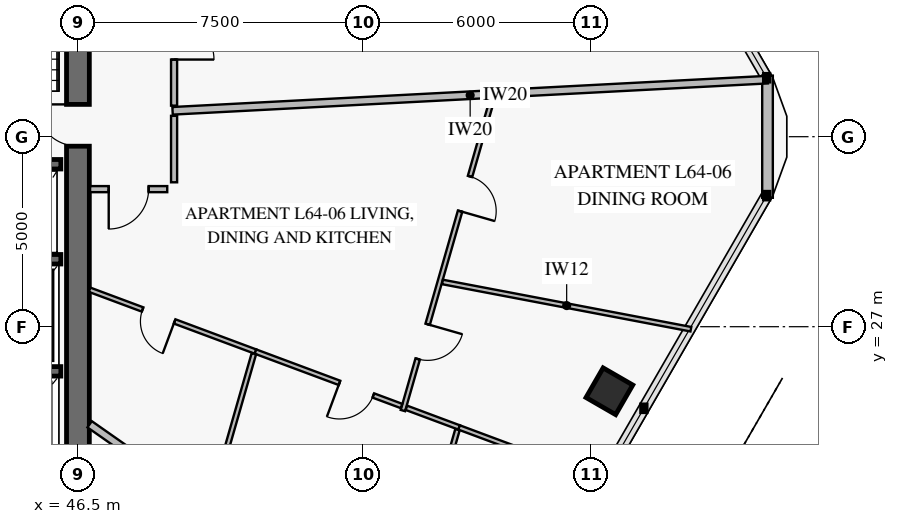
"""IFC4 building model, lengths in metres.
Left out: names, types, materials, properties, quantities, classifications, styles, units other than length and angle.
Written with IfcOpenShell. Run it as: python <this file> out.ifc"""

import sys

from ifc_helpers import new_model, si_unit, direction, frame, frame_2d, origin, origin_2d, place, context, subcontext, project, spatial, rectangle, extrude, element, fill, save


model = new_model("IFC4")
c1 = context("Model", 3, precision=1e-05, world=origin(), true_north=direction((0.0, 1.0)))
c2 = subcontext(c1, "Body", "Model", "MODEL_VIEW")
j1 = project(units=[si_unit("LENGTHUNIT", "METRE"), si_unit("PLANEANGLEUNIT", "RADIAN")], contexts=[c1])
p1 = place(None, origin())
s1 = spatial("IfcSite", under=j1, at=p1, CompositionType="ELEMENT")
p2 = place(p1, origin())
s2 = spatial("IfcBuilding", under=s1, at=p2, CompositionType="ELEMENT")
p3 = place(p2, frame((0.0, 0.0, 254.0)))
s3 = spatial("IfcBuildingStorey", under=s2, at=p3, CompositionType="ELEMENT", Elevation=254.0)
p4 = place(p3, frame((46.5, 22.8, 0.0), z_axis=(0.0, 0.0, 1.0), x_axis=(0.0, 1.0, 0.0)))
e1 = element("IfcWall", 1, at=p4, inside=s3, PredefinedType="SHEAR", context=c2, shape_type="SweptSolid", body=[
    extrude(rectangle(XDim=18.4, YDim=0.6, at=frame_2d((9.2, 0.0))), origin(), (0.0, 0.0, 1.0), 3.8),
])
p5 = place(p4, frame((8.95, 0.0, 0.0)))
e2 = element("IfcOpeningElement", 2, at=p5, cuts=e1, PredefinedType="OPENING", context=c2, shape_type="SweptSolid", body=[
    extrude(rectangle(XDim=1.1, YDim=2.15, at=frame_2d((0.55, 1.075))), frame((0.0, 0.312, 0.0), z_axis=(0.0, -1.0, 0.0), x_axis=(1.0, 0.0, 0.0)), (0.0, 0.0, 1.0), 0.624),
])
p6 = place(p3, frame((60.485, 25.301, 0.0), z_axis=(0.0, 0.0, 1.0), x_axis=(0.5, 0.866025403784, 0.0)))
e3 = element("IfcColumn", 3, at=p6, inside=s3, PredefinedType="COLUMN", context=c2, shape_type="SweptSolid", body=[
    extrude(rectangle(XDim=0.9, YDim=0.9, at=origin_2d()), origin(), (0.0, 0.0, 1.0), 3.55),
])
p7 = place(p3, frame((64.645, 33.607, 0.0), z_axis=(0.0, 0.0, 1.0), x_axis=(0.0, -1.0, 0.0)))
e4 = element("IfcWall", 4, at=p7, inside=s3, PredefinedType="SOLIDWALL", context=c2, shape_type="SweptSolid", body=[
    extrude(rectangle(XDim=3.215, YDim=0.28, at=frame_2d((1.607, 0.0))), origin(), (0.0, 0.0, 1.0), 3.55),
])
p8 = place(p3, frame((25.95, 31.275, 0.0), z_axis=(0.0, 0.0, 1.0), x_axis=(1.0, 0.0, 0.0)))
e5 = element("IfcWall", 5, at=p8, inside=s3, PredefinedType="SOLIDWALL", context=c2, shape_type="SweptSolid", body=[
    extrude(rectangle(XDim=20.1, YDim=0.25, at=frame_2d((10.05, 0.0))), origin(), (0.0, 0.0, 1.0), 3.8),
])
p9 = place(p8, frame((2.6, 0.0, 0.0)))
e6 = element("IfcOpeningElement", 6, at=p9, cuts=e5, PredefinedType="OPENING", context=c2, shape_type="SweptSolid", body=[
    extrude(rectangle(XDim=1.1, YDim=2.15, at=frame_2d((0.55, 1.075))), frame((0.0, 0.137, 0.0), z_axis=(0.0, -1.0, 0.0), x_axis=(1.0, 0.0, 0.0)), (0.0, 0.0, 1.0), 0.274),
])
p10 = place(p8, frame((10.6, 0.0, 0.0)))
e7 = element("IfcOpeningElement", 7, at=p10, cuts=e5, PredefinedType="OPENING", context=c2, shape_type="SweptSolid", body=[
    extrude(rectangle(XDim=1.1, YDim=2.15, at=frame_2d((0.55, 1.075))), frame((0.0, 0.137, 0.0), z_axis=(0.0, -1.0, 0.0), x_axis=(1.0, 0.0, 0.0)), (0.0, 0.0, 1.0), 0.274),
])
p11 = place(p8, frame((16.35, 0.0, 0.0)))
e8 = element("IfcOpeningElement", 8, at=p11, cuts=e5, PredefinedType="OPENING", context=c2, shape_type="SweptSolid", body=[
    extrude(rectangle(XDim=1.1, YDim=2.15, at=frame_2d((0.55, 1.075))), frame((0.0, 0.137, 0.0), z_axis=(0.0, -1.0, 0.0), x_axis=(1.0, 0.0, 0.0)), (0.0, 0.0, 1.0), 0.274),
])
for number, where, z_axis, x_axis in (
    (9, (43.8, 25.825, 0.0), (0.0, 0.0, 1.0), (1.0, 0.0, 0.0)),
    (10, (43.8, 28.775, 0.0), (0.0, 0.0, 1.0), (1.0, 0.0, 0.0)),
):
    element("IfcWall", number, at=place(p3, frame(where, z_axis=z_axis, x_axis=x_axis)), inside=s3, PredefinedType="SOLIDWALL", context=c2, shape_type="SweptSolid", body=[
        extrude(rectangle(XDim=2.25, YDim=0.25, at=frame_2d((1.125, 0.0))), origin(), (0.0, 0.0, 1.0), 3.8),
    ])
p12 = place(p3, frame((55.051, 24.793, 0.0), z_axis=(0.0, 0.0, 1.0), x_axis=(0.275631107549, 0.961263487578, 0.0)))
e11 = element("IfcWall", 11, at=p12, inside=s3, PredefinedType="PARTITIONING", context=c2, shape_type="SweptSolid", body=[
    extrude(rectangle(XDim=8.574, YDim=0.12, at=frame_2d((4.287, 0.0))), origin(), (0.0, 0.0, 1.0), 2.95),
])
p13 = place(p12, frame((1.413, 0.0, 0.0)))
e12 = element("IfcOpeningElement", 12, at=p13, cuts=e11, PredefinedType="OPENING", context=c2, shape_type="SweptSolid", body=[
    extrude(rectangle(XDim=0.95, YDim=2.1, at=frame_2d((0.475, 1.05))), frame((0.0, 0.072, 0.0), z_axis=(0.0, -1.0, 0.0), x_axis=(1.0, 0.0, 0.0)), (0.0, 0.0, 1.0), 0.144),
])
p14 = place(p12, frame((5.459, 0.0, 0.0)))
e13 = element("IfcOpeningElement", 13, at=p14, cuts=e11, PredefinedType="OPENING", context=c2, shape_type="SweptSolid", body=[
    extrude(rectangle(XDim=0.95, YDim=2.1, at=frame_2d((0.475, 1.05))), frame((0.0, 0.072, 0.0), z_axis=(0.0, -1.0, 0.0), x_axis=(1.0, 0.0, 0.0)), (0.0, 0.0, 1.0), 0.144),
])
p15 = place(p3, frame((46.808, 27.972, 0.0), z_axis=(0.0, 0.0, 1.0), x_axis=(0.937036038674, -0.349232676344, 0.0)))
e14 = element("IfcWall", 14, at=p15, inside=s3, PredefinedType="PARTITIONING", context=c2, shape_type="SweptSolid", body=[
    extrude(rectangle(XDim=4.657, YDim=0.12, at=frame_2d((2.329, 0.0))), origin(), (0.0, 0.0, 1.0), 3.55),
])
p16 = place(p15, frame((1.487, 0.0, 0.0)))
e15 = element("IfcOpeningElement", 15, at=p16, cuts=e14, PredefinedType="OPENING", context=c2, shape_type="SweptSolid", body=[
    extrude(rectangle(XDim=0.9, YDim=2.1, at=frame_2d((0.45, 1.05))), frame((0.0, 0.072, 0.0), z_axis=(0.0, -1.0, 0.0), x_axis=(1.0, 0.0, 0.0)), (0.0, 0.0, 1.0), 0.144),
])
p17 = place(p3, frame((51.172, 26.345, 0.0), z_axis=(0.0, 0.0, 1.0), x_axis=(0.937041629646, -0.349217674682, 0.0)))
e16 = element("IfcWall", 16, at=p17, inside=s3, PredefinedType="PARTITIONING", context=c2, shape_type="SweptSolid", body=[
    extrude(rectangle(XDim=4.101, YDim=0.12, at=frame_2d((2.051, 0.0))), origin(), (0.0, 0.0, 1.0), 3.15),
])
p18 = place(p17, frame((2.359, 0.0, 0.0)))
e17 = element("IfcOpeningElement", 17, at=p18, cuts=e16, PredefinedType="OPENING", context=c2, shape_type="SweptSolid", body=[
    extrude(rectangle(XDim=0.95, YDim=2.1, at=frame_2d((0.475, 1.05))), frame((0.0, 0.072, 0.0), z_axis=(0.0, -1.0, 0.0), x_axis=(1.0, 0.0, 0.0)), (0.0, 0.0, 1.0), 0.144),
])
p19 = place(p3, frame((55.143, 24.866, 0.0), z_axis=(0.0, 0.0, 1.0), x_axis=(0.937038743308, -0.349225419378, 0.0)))
e18 = element("IfcWall", 18, at=p19, inside=s3, PredefinedType="PARTITIONING", context=c2, shape_type="SweptSolid", body=[
    extrude(rectangle(XDim=1.481, YDim=0.12, at=frame_2d((0.74, 0.0))), origin(), (0.0, 0.0, 1.0), 3.55),
])
p20 = place(p3, frame((54.932, 18.867, 0.0), z_axis=(0.0, 0.0, 1.0), x_axis=(0.275658043462, 0.961255763611, 0.0)))
e19 = element("IfcWall", 19, at=p20, inside=s3, PredefinedType="PARTITIONING", context=c2, shape_type="SweptSolid", body=[
    extrude(rectangle(XDim=5.644, YDim=0.12, at=frame_2d((2.822, 0.0))), origin(), (0.0, 0.0, 1.0), 3.55),
])
p21 = place(p20, frame((2.431, 0.0, 0.0)))
e20 = element("IfcOpeningElement", 20, at=p21, cuts=e19, PredefinedType="OPENING", context=c2, shape_type="SweptSolid", body=[
    extrude(rectangle(XDim=0.95, YDim=2.1, at=frame_2d((0.475, 1.05))), frame((0.0, 0.072, 0.0), z_axis=(0.0, -1.0, 0.0), x_axis=(1.0, 0.0, 0.0)), (0.0, 0.0, 1.0), 0.144),
])
p22 = place(p3, frame((46.82, 30.62, 0.0), z_axis=(0.0, 0.0, 1.0), x_axis=(1.0, 0.0, 0.0)))
e21 = element("IfcWall", 21, at=p22, inside=s3, PredefinedType="PARTITIONING", context=c2, shape_type="SweptSolid", body=[
    extrude(rectangle(XDim=2.03, YDim=0.16, at=frame_2d((1.015, 0.0))), origin(), (0.0, 0.0, 1.0), 3.55),
])
p23 = place(p22, frame((0.49, 0.0, 0.0)))
e22 = element("IfcOpeningElement", 22, at=p23, cuts=e21, PredefinedType="OPENING", context=c2, shape_type="SweptSolid", body=[
    extrude(rectangle(XDim=1.05, YDim=2.15, at=frame_2d((0.525, 1.075))), frame((0.0, 0.092, 0.0), z_axis=(0.0, -1.0, 0.0), x_axis=(1.0, 0.0, 0.0)), (0.0, 0.0, 1.0), 0.184),
])
p24 = place(p3, frame((49.03, 32.817, 0.0), z_axis=(0.0, 0.0, 1.0), x_axis=(0.0, 1.0, 0.0)))
e23 = element("IfcWall", 23, at=p24, inside=s3, PredefinedType="PARTITIONING", context=c2, shape_type="SweptSolid", body=[
    extrude(rectangle(XDim=3.476, YDim=0.16, at=frame_2d((1.738, 0.0))), origin(), (0.0, 0.0, 1.0), 2.95),
])
p25 = place(p24, frame((1.213, 0.0, 0.0)))
e24 = element("IfcOpeningElement", 24, at=p25, cuts=e23, PredefinedType="OPENING", context=c2, shape_type="SweptSolid", body=[
    extrude(rectangle(XDim=1.05, YDim=2.15, at=frame_2d((0.525, 1.075))), frame((0.0, 0.092, 0.0), z_axis=(0.0, -1.0, 0.0), x_axis=(1.0, 0.0, 0.0)), (0.0, 0.0, 1.0), 0.184),
])
p26 = place(p3, frame((46.808, 24.432, 0.0), z_axis=(0.0, 0.0, 1.0), x_axis=(0.819149112162, -0.57358062384, 0.0)))
e25 = element("IfcWall", 25, at=p26, inside=s3, PredefinedType="PARTITIONING", context=c2, shape_type="SweptSolid", body=[
    extrude(rectangle(XDim=12.467, YDim=0.2, at=frame_2d((6.233, 0.0))), origin(), (0.0, 0.0, 1.0), 2.93),
])
p27 = place(p3, frame((56.092, 28.177, 0.0), z_axis=(0.0, 0.0, 1.0), x_axis=(0.982380617182, -0.18689120628, 0.0)))
e26 = element("IfcWall", 26, at=p27, inside=s3, PredefinedType="PARTITIONING", context=c2, shape_type="SweptSolid", body=[
    extrude(rectangle(XDim=6.653, YDim=0.12, at=frame_2d((3.327, 0.0))), origin(), (0.0, 0.0, 1.0), 2.93),
])
p28 = place(p3, frame((56.53, 24.349, 0.0), z_axis=(0.0, 0.0, 1.0), x_axis=(0.937033786593, -0.349238718906, 0.0)))
e27 = element("IfcWall", 27, at=p28, inside=s3, PredefinedType="PARTITIONING", context=c2, shape_type="SweptSolid", body=[
    extrude(rectangle(XDim=4.019, YDim=0.12, at=frame_2d((2.01, 0.0))), origin(), (0.0, 0.0, 1.0), 2.93),
])
p29 = place(p3, frame((49.995, 22.332, 0.0), z_axis=(0.0, 0.0, 1.0), x_axis=(0.27563759031, 0.961261628699, 0.0)))
e28 = element("IfcWall", 28, at=p29, inside=s3, PredefinedType="PARTITIONING", context=c2, shape_type="SweptSolid", body=[
    extrude(rectangle(XDim=4.116, YDim=0.12, at=frame_2d((2.058, 0.0))), origin(), (0.0, 0.0, 1.0), 3.55),
])
p30 = place(p3, frame((48.99, 32.681, 0.0), z_axis=(0.0, 0.0, 1.0), x_axis=(0.998629458789, 0.052337405734, 0.0)))
e29 = element("IfcWall", 29, at=p30, inside=s3, PredefinedType="PARTITIONING", context=c2, shape_type="SweptSolid", body=[
    extrude(rectangle(XDim=15.683, YDim=0.2, at=frame_2d((7.841, 0.0))), origin(), (0.0, 0.0, 1.0), 2.93),
])
p31 = place(p3, frame((49.03, 30.8, 0.0), z_axis=(0.0, 0.0, 1.0), x_axis=(0.0, 1.0, 0.0)))
e30 = element("IfcWall", 30, at=p31, inside=s3, PredefinedType="PARTITIONING", context=c2, shape_type="SweptSolid", body=[
    extrude(rectangle(XDim=1.749, YDim=0.16, at=frame_2d((0.875, 0.0))), origin(), (0.0, 0.0, 1.0), 3.55),
])
p32 = place(p5, origin())
e31 = element("IfcDoor", 31, at=p32, inside=s3, OperationType="SINGLE_SWING_RIGHT", PredefinedType="USERDEFINED", context=c2, shape_type="SweptSolid", body=[
    extrude(rectangle(XDim=1.1, YDim=2.15, at=frame_2d((0.55, 1.075))), frame((0.0, 0.025, 0.0), z_axis=(0.0, -1.0, 0.0), x_axis=(1.0, 0.0, 0.0)), (0.0, 0.0, 1.0), 0.05),
])
fill(e2, e31)
p33 = place(p13, frame((0.95, 0.0, 0.0), z_axis=(0.0, 0.0, 1.0), x_axis=(-1.0, 0.0, 0.0)))
e32 = element("IfcDoor", 32, at=p33, inside=s3, OperationType="SINGLE_SWING_LEFT", PredefinedType="DOOR", context=c2, shape_type="SweptSolid", body=[
    extrude(rectangle(XDim=0.95, YDim=2.1, at=frame_2d((0.475, 1.05))), frame((0.0, 0.025, 0.0), z_axis=(0.0, -1.0, 0.0), x_axis=(1.0, 0.0, 0.0)), (0.0, 0.0, 1.0), 0.05),
])
fill(e12, e32)
p34 = place(p14, frame((0.95, 0.0, 0.0), z_axis=(0.0, 0.0, 1.0), x_axis=(-1.0, 0.0, 0.0)))
e33 = element("IfcDoor", 33, at=p34, inside=s3, OperationType="SINGLE_SWING_RIGHT", PredefinedType="DOOR", context=c2, shape_type="SweptSolid", body=[
    extrude(rectangle(XDim=0.95, YDim=2.1, at=frame_2d((0.475, 1.05))), frame((0.0, 0.025, 0.0), z_axis=(0.0, -1.0, 0.0), x_axis=(1.0, 0.0, 0.0)), (0.0, 0.0, 1.0), 0.05),
])
fill(e13, e33)
p35 = place(p16, frame((0.9, 0.0, 0.0), z_axis=(0.0, 0.0, 1.0), x_axis=(-1.0, 0.0, 0.0)))
e34 = element("IfcDoor", 34, at=p35, inside=s3, OperationType="SINGLE_SWING_LEFT", PredefinedType="DOOR", context=c2, shape_type="SweptSolid", body=[
    extrude(rectangle(XDim=0.9, YDim=2.1, at=frame_2d((0.45, 1.05))), frame((0.0, 0.025, 0.0), z_axis=(0.0, -1.0, 0.0), x_axis=(1.0, 0.0, 0.0)), (0.0, 0.0, 1.0), 0.05),
])
fill(e15, e34)
p36 = place(p18, frame((0.95, 0.0, 0.0), z_axis=(0.0, 0.0, 1.0), x_axis=(-1.0, 0.0, 0.0)))
e35 = element("IfcDoor", 35, at=p36, inside=s3, OperationType="SINGLE_SWING_RIGHT", PredefinedType="DOOR", context=c2, shape_type="SweptSolid", body=[
    extrude(rectangle(XDim=0.95, YDim=2.1, at=frame_2d((0.475, 1.05))), frame((0.0, 0.025, 0.0), z_axis=(0.0, -1.0, 0.0), x_axis=(1.0, 0.0, 0.0)), (0.0, 0.0, 1.0), 0.05),
])
fill(e17, e35)
p37 = place(p23, frame((1.05, 0.0, 0.0), z_axis=(0.0, 0.0, 1.0), x_axis=(-1.0, 0.0, 0.0)))
e36 = element("IfcDoor", 36, at=p37, inside=s3, OperationType="SINGLE_SWING_RIGHT", PredefinedType="DOOR", context=c2, shape_type="SweptSolid", body=[
    extrude(rectangle(XDim=1.05, YDim=2.15, at=frame_2d((0.525, 1.075))), frame((0.0, 0.025, 0.0), z_axis=(0.0, -1.0, 0.0), x_axis=(1.0, 0.0, 0.0)), (0.0, 0.0, 1.0), 0.05),
])
fill(e22, e36)
p38 = place(p25, frame((1.05, 0.0, 0.0), z_axis=(0.0, 0.0, 1.0), x_axis=(-1.0, 0.0, 0.0)))
e37 = element("IfcDoor", 37, at=p38, inside=s3, OperationType="SINGLE_SWING_RIGHT", PredefinedType="DOOR", context=c2, shape_type="SweptSolid", body=[
    extrude(rectangle(XDim=1.05, YDim=2.15, at=frame_2d((0.525, 1.075))), frame((0.0, 0.025, 0.0), z_axis=(0.0, -1.0, 0.0), x_axis=(1.0, 0.0, 0.0)), (0.0, 0.0, 1.0), 0.05),
])
fill(e24, e37)
save(model, sys.argv[1])
